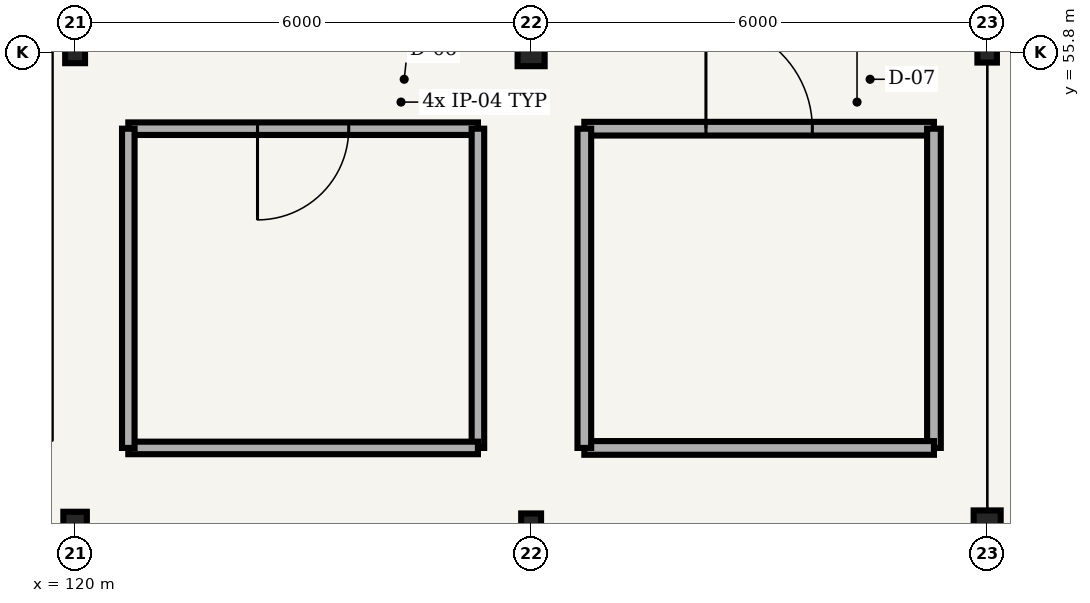
"""IFC4 building model, lengths in metres.
Left out: names, types, materials, properties, quantities, classifications, styles, units other than length and angle.
Written with IfcOpenShell. Run it as: python <this file> out.ifc"""

import sys

from ifc_helpers import new_model, si_unit, direction, frame, frame_2d, origin, origin_2d, place, context, subcontext, project, spatial, rectangle, hollow_circle, i_section, extrude, element, fill, save


model = new_model("IFC4")
c1 = context("Model", 3, precision=1e-05, world=origin(), true_north=direction((0.0, 1.0)))
c2 = subcontext(c1, "Body", "Model", "MODEL_VIEW")
j1 = project(units=[si_unit("LENGTHUNIT", "METRE"), si_unit("PLANEANGLEUNIT", "RADIAN")], contexts=[c1])
p1 = place(None, origin())
s1 = spatial("IfcSite", under=j1, at=p1, CompositionType="ELEMENT")
p2 = place(p1, origin())
s2 = spatial("IfcBuilding", under=s1, at=p2, CompositionType="ELEMENT")
p3 = place(p2, frame((0.0, 0.0, 5.4)))
s3 = spatial("IfcBuildingStorey", under=s2, at=p3, CompositionType="ELEMENT", Elevation=5.4)
p4 = place(p3, frame((120.0, 49.6, 0.0), z_axis=(0.0, 0.0, 1.0), x_axis=(1.0, 0.0, 0.0)))
e1 = element("IfcColumn", 1, at=p4, inside=s3, PredefinedType="COLUMN", context=c2, shape_type="SweptSolid", body=[
    extrude(i_section(OverallWidth=0.309, OverallDepth=0.321, WebThickness=0.014, FlangeThickness=0.022, FilletRadius=0.015, at=origin_2d()), origin(), (0.0, 0.0, 1.0), 5.4),
])
for number, where, z_axis, x_axis in (
    (2, (120.0, 55.8, 0.0), (0.0, 0.0, 1.0), (1.0, 0.0, 0.0)),
    (3, (126.0, 49.6, 0.0), (0.0, 0.0, 1.0), (1.0, 0.0, 0.0)),
):
    element("IfcColumn", number, at=place(p3, frame(where, z_axis=z_axis, x_axis=x_axis)), inside=s3, PredefinedType="COLUMN", context=c2, shape_type="SweptSolid", body=[
        extrude(i_section(OverallWidth=0.261, OverallDepth=0.276, WebThickness=0.015, FlangeThickness=0.025, FilletRadius=0.013, at=origin_2d()), origin(), (0.0, 0.0, 1.0), 5.4),
    ])
for number, where, z_axis, x_axis in (
    (4, (126.0, 55.8, 0.0), (0.0, 0.0, 1.0), (1.0, 0.0, 0.0)),
    (5, (132.0, 49.6, 0.0), (0.0, 0.0, 1.0), (1.0, 0.0, 0.0)),
):
    element("IfcColumn", number, at=place(p3, frame(where, z_axis=z_axis, x_axis=x_axis)), inside=s3, PredefinedType="COLUMN", context=c2, shape_type="SweptSolid", body=[
        extrude(hollow_circle(Radius=0.178, WallThickness=0.012, at=origin_2d()), origin(), (0.0, 0.0, 1.0), 5.4),
    ])
p5 = place(p3, frame((132.0, 55.8, 0.0), z_axis=(0.0, 0.0, 1.0), x_axis=(1.0, 0.0, 0.0)))
e6 = element("IfcColumn", 6, at=p5, inside=s3, PredefinedType="COLUMN", context=c2, shape_type="SweptSolid", body=[
    extrude(i_section(OverallWidth=0.256, OverallDepth=0.26, WebThickness=0.01, FlangeThickness=0.017, FilletRadius=0.013, at=origin_2d()), origin(), (0.0, 0.0, 1.0), 5.4),
])
p6 = place(p3, frame((120.7, 54.8, 0.0), z_axis=(0.0, 0.0, 1.0), x_axis=(1.0, 0.0, 0.0)))
e7 = element("IfcWall", 7, at=p6, inside=s3, PredefinedType="PARTITIONING", context=c2, shape_type="SweptSolid", body=[
    extrude(rectangle(XDim=4.6, YDim=0.165, at=frame_2d((2.3, 0.0))), origin(), (0.0, 0.0, 1.0), 4.35),
])
p7 = place(p6, frame((1.7, 0.0, 0.0)))
e8 = element("IfcOpeningElement", 8, at=p7, cuts=e7, PredefinedType="OPENING", context=c2, shape_type="SweptSolid", body=[
    extrude(rectangle(XDim=1.2, YDim=2.1, at=frame_2d((0.6, 1.05))), frame((0.0, 0.093, 0.0), z_axis=(0.0, -1.0, 0.0), x_axis=(1.0, 0.0, 0.0)), (0.0, 0.0, 1.0), 0.185),
])
p8 = place(p3, frame((125.3, 54.8, 0.0), z_axis=(0.0, 0.0, 1.0), x_axis=(0.0, -1.0, 0.0)))
e9 = element("IfcWall", 9, at=p8, inside=s3, PredefinedType="PARTITIONING", context=c2, shape_type="SweptSolid", body=[
    extrude(rectangle(XDim=4.2, YDim=0.165, at=frame_2d((2.1, 0.0))), origin(), (0.0, 0.0, 1.0), 4.35),
])
p9 = place(p3, frame((125.3, 50.6, 0.0), z_axis=(0.0, 0.0, 1.0), x_axis=(-1.0, 0.0, 0.0)))
e10 = element("IfcWall", 10, at=p9, inside=s3, PredefinedType="PARTITIONING", context=c2, shape_type="SweptSolid", body=[
    extrude(rectangle(XDim=4.6, YDim=0.165, at=frame_2d((2.3, 0.0))), origin(), (0.0, 0.0, 1.0), 4.35),
])
p10 = place(p3, frame((120.7, 50.6, 0.0), z_axis=(0.0, 0.0, 1.0), x_axis=(0.0, 1.0, 0.0)))
e11 = element("IfcWall", 11, at=p10, inside=s3, PredefinedType="PARTITIONING", context=c2, shape_type="SweptSolid", body=[
    extrude(rectangle(XDim=4.2, YDim=0.165, at=frame_2d((2.1, 0.0))), origin(), (0.0, 0.0, 1.0), 4.35),
])
p11 = place(p3, frame((126.7, 54.8, 0.0), z_axis=(0.0, 0.0, 1.0), x_axis=(1.0, 0.0, 0.0)))
e12 = element("IfcWall", 12, at=p11, inside=s3, PredefinedType="PARTITIONING", context=c2, shape_type="SweptSolid", body=[
    extrude(rectangle(XDim=4.6, YDim=0.18, at=frame_2d((2.3, 0.0))), origin(), (0.0, 0.0, 1.0), 4.35),
])
p12 = place(p11, frame((1.6, 0.0, 0.0)))
e13 = element("IfcOpeningElement", 13, at=p12, cuts=e12, PredefinedType="OPENING", context=c2, shape_type="SweptSolid", body=[
    extrude(rectangle(XDim=1.4, YDim=2.1, at=frame_2d((0.7, 1.05))), frame((0.0, 0.1, 0.0), z_axis=(0.0, -1.0, 0.0), x_axis=(1.0, 0.0, 0.0)), (0.0, 0.0, 1.0), 0.2),
])
p13 = place(p3, frame((131.3, 54.8, 0.0), z_axis=(0.0, 0.0, 1.0), x_axis=(0.0, -1.0, 0.0)))
e14 = element("IfcWall", 14, at=p13, inside=s3, PredefinedType="PARTITIONING", context=c2, shape_type="SweptSolid", body=[
    extrude(rectangle(XDim=4.2, YDim=0.18, at=frame_2d((2.1, 0.0))), origin(), (0.0, 0.0, 1.0), 4.35),
])
p14 = place(p3, frame((131.3, 50.6, 0.0), z_axis=(0.0, 0.0, 1.0), x_axis=(-1.0, 0.0, 0.0)))
e15 = element("IfcWall", 15, at=p14, inside=s3, PredefinedType="PARTITIONING", context=c2, shape_type="SweptSolid", body=[
    extrude(rectangle(XDim=4.6, YDim=0.18, at=frame_2d((2.3, 0.0))), origin(), (0.0, 0.0, 1.0), 4.35),
])
p15 = place(p3, frame((126.7, 50.6, 0.0), z_axis=(0.0, 0.0, 1.0), x_axis=(0.0, 1.0, 0.0)))
e16 = element("IfcWall", 16, at=p15, inside=s3, PredefinedType="PARTITIONING", context=c2, shape_type="SweptSolid", body=[
    extrude(rectangle(XDim=4.2, YDim=0.18, at=frame_2d((2.1, 0.0))), origin(), (0.0, 0.0, 1.0), 4.35),
])
p16 = place(p7, origin())
e17 = element("IfcDoor", 17, at=p16, inside=s3, OperationType="SINGLE_SWING_RIGHT", PredefinedType="DOOR", context=c2, shape_type="SweptSolid", body=[
    extrude(rectangle(XDim=1.2, YDim=2.1, at=frame_2d((0.6, 1.05))), frame((0.0, 0.025, 0.0), z_axis=(0.0, -1.0, 0.0), x_axis=(1.0, 0.0, 0.0)), (0.0, 0.0, 1.0), 0.05),
])
fill(e8, e17)
p17 = place(p12, origin())
e18 = element("IfcDoor", 18, at=p17, inside=s3, OperationType="SINGLE_SWING_LEFT", PredefinedType="DOOR", context=c2, shape_type="SweptSolid", body=[
    extrude(rectangle(XDim=1.4, YDim=2.1, at=frame_2d((0.7, 1.05))), frame((0.0, 0.025, 0.0), z_axis=(0.0, -1.0, 0.0), x_axis=(1.0, 0.0, 0.0)), (0.0, 0.0, 1.0), 0.05),
])
fill(e13, e18)
save(model, sys.argv[1])
